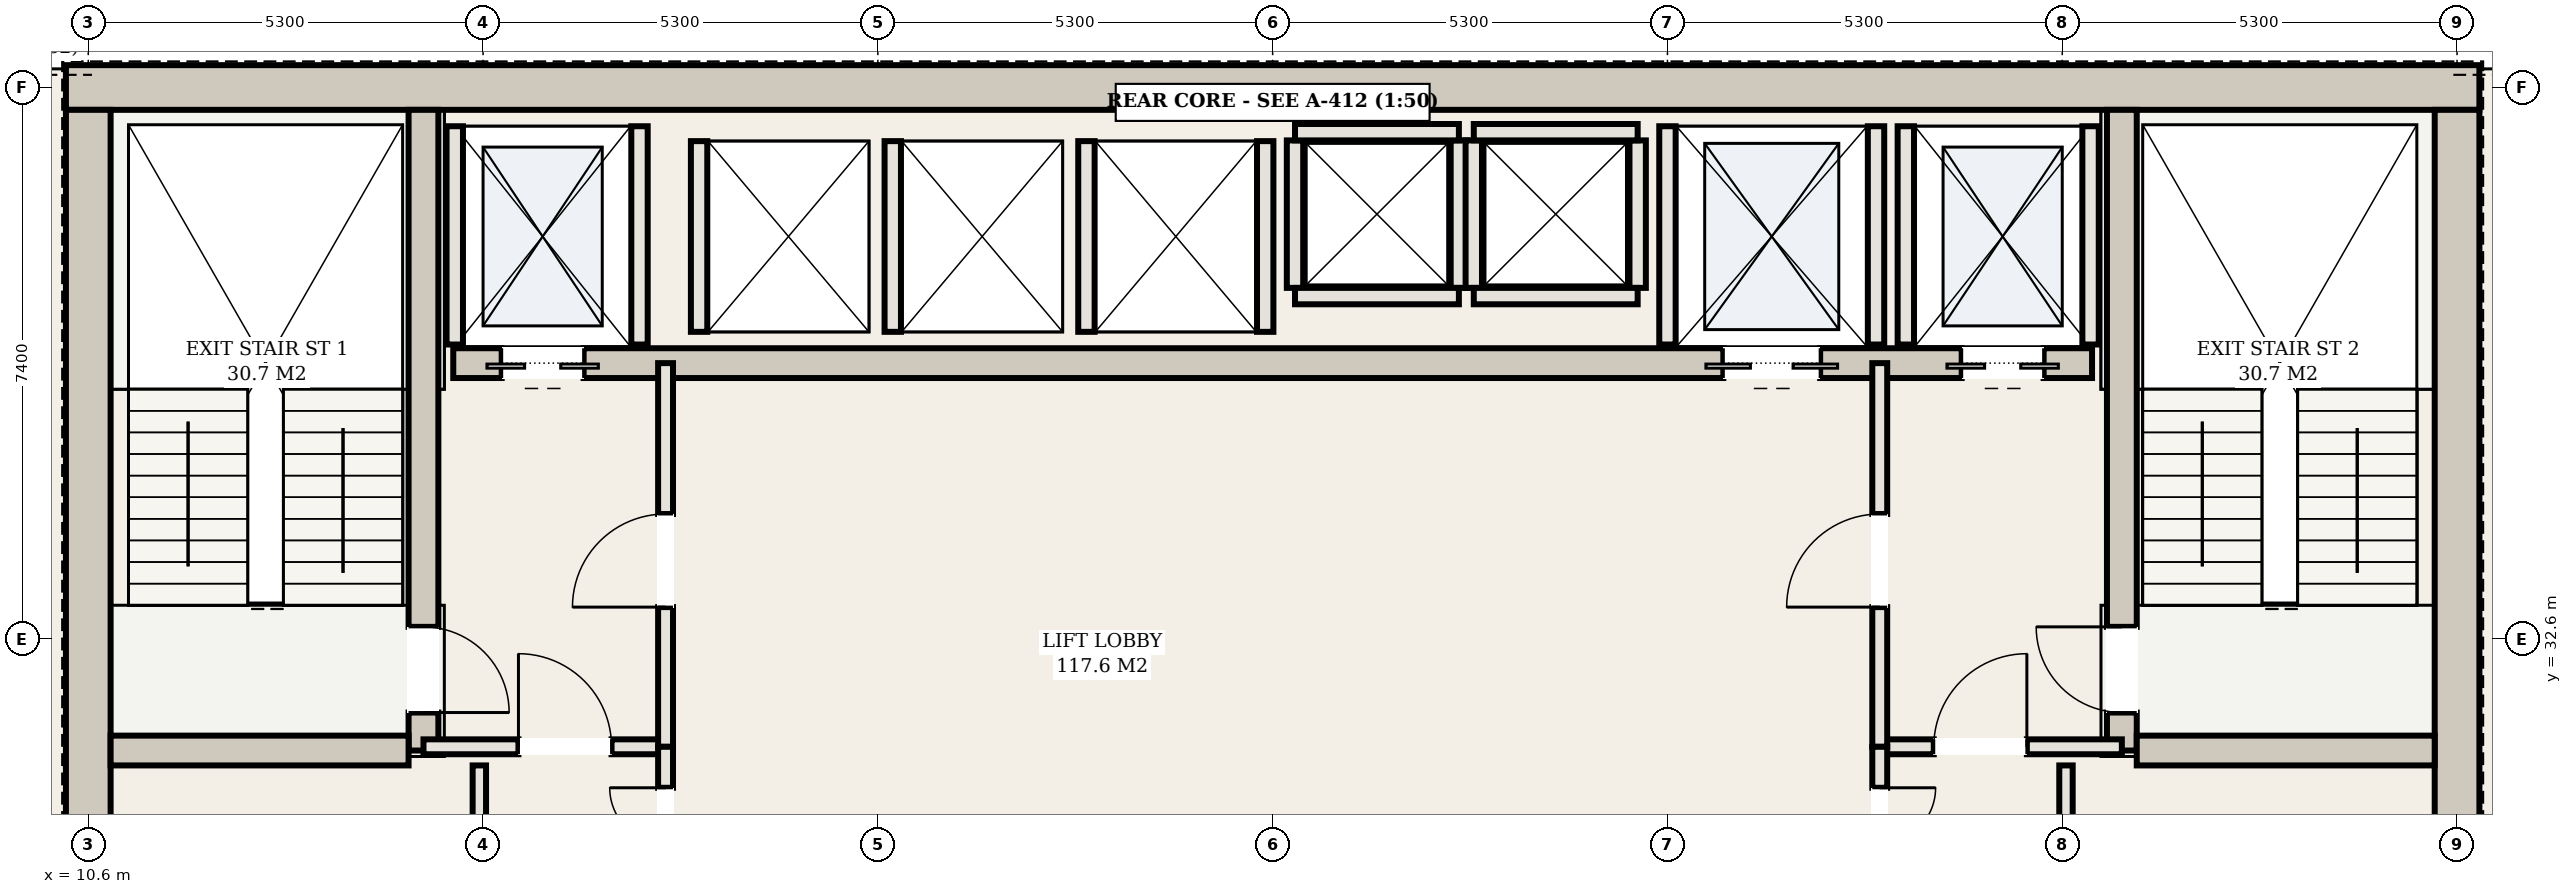
"""IFC4 building model, lengths in metres.
Left out: names, types, materials, properties, quantities, classifications, styles, units other than length and angle.
Written with IfcOpenShell. Run it as: python <this file> out.ifc"""

import sys

from ifc_helpers import new_model, si_unit, direction, frame, frame_2d, origin, place, context, subcontext, project, spatial, rectangle, extrude, element, fill, save


model = new_model("IFC4")
c1 = context("Model", 3, precision=1e-05, world=origin(), true_north=direction((0.0, 1.0)))
c2 = subcontext(c1, "Body", "Model", "MODEL_VIEW")
j1 = project(units=[si_unit("LENGTHUNIT", "METRE"), si_unit("PLANEANGLEUNIT", "RADIAN")], contexts=[c1])
p1 = place(None, origin())
s1 = spatial("IfcSite", under=j1, at=p1, CompositionType="ELEMENT")
p2 = place(p1, origin())
s2 = spatial("IfcBuilding", under=s1, at=p2, CompositionType="ELEMENT")
p3 = place(p2, frame((0.0, 0.0, 185.4)))
s3 = spatial("IfcBuildingStorey", under=s2, at=p3, CompositionType="ELEMENT", Elevation=185.4)
p4 = place(p3, frame((10.3, 40.0, 0.0), z_axis=(0.0, 0.0, 1.0), x_axis=(1.0, 0.0, 0.0)))
e1 = element("IfcWall", 1, at=p4, inside=s3, PredefinedType="SHEAR", context=c2, shape_type="SweptSolid", body=[
    extrude(rectangle(XDim=32.4, YDim=0.6, at=frame_2d((16.2, 0.0))), origin(), (0.0, 0.0, 1.0), 6.56),
])
for number, where, z_axis, x_axis in (
    (2, (10.6, 25.5, 0.0), (0.0, 0.0, 1.0), (0.0, 1.0, 0.0)),
    (3, (42.4, 25.5, 0.0), (0.0, 0.0, 1.0), (0.0, 1.0, 0.0)),
):
    element("IfcWall", number, at=place(p3, frame(where, z_axis=z_axis, x_axis=x_axis)), inside=s3, PredefinedType="SHEAR", context=c2, shape_type="SweptSolid", body=[
        extrude(rectangle(XDim=14.2, YDim=0.6, at=frame_2d((7.1, 0.0))), origin(), (0.0, 0.0, 1.0), 6.56),
    ])
p5 = place(p3, frame((15.1, 31.1, 0.0), z_axis=(0.0, 0.0, 1.0), x_axis=(0.0, 1.0, 0.0)))
e4 = element("IfcWall", 4, at=p5, inside=s3, PredefinedType="SHEAR", context=c2, shape_type="SweptSolid", body=[
    extrude(rectangle(XDim=8.6, YDim=0.4, at=frame_2d((4.3, 0.0))), origin(), (0.0, 0.0, 1.0), 6.56),
])
p6 = place(p5, frame((0.51, 0.0, 0.0)))
e5 = element("IfcOpeningElement", 5, at=p6, cuts=e4, PredefinedType="OPENING", context=c2, shape_type="SweptSolid", body=[
    extrude(rectangle(XDim=1.15, YDim=2.2, at=frame_2d((0.575, 1.1))), frame((0.0, 0.21, 0.0), z_axis=(0.0, -1.0, 0.0), x_axis=(1.0, 0.0, 0.0)), (0.0, 0.0, 1.0), 0.42),
])
p7 = place(p3, frame((10.9, 31.1, 0.0), z_axis=(0.0, 0.0, 1.0), x_axis=(1.0, 0.0, 0.0)))
e6 = element("IfcWall", 6, at=p7, inside=s3, PredefinedType="SHEAR", context=c2, shape_type="SweptSolid", body=[
    extrude(rectangle(XDim=4.0, YDim=0.4, at=frame_2d((2.0, 0.0))), origin(), (0.0, 0.0, 1.0), 6.56),
])
p8 = place(p3, frame((37.9, 31.1, 0.0), z_axis=(0.0, 0.0, 1.0), x_axis=(0.0, 1.0, 0.0)))
e7 = element("IfcWall", 7, at=p8, inside=s3, PredefinedType="SHEAR", context=c2, shape_type="SweptSolid", body=[
    extrude(rectangle(XDim=8.6, YDim=0.4, at=frame_2d((4.3, 0.0))), origin(), (0.0, 0.0, 1.0), 6.56),
])
p9 = place(p8, frame((0.51, 0.0, 0.0)))
e8 = element("IfcOpeningElement", 8, at=p9, cuts=e7, PredefinedType="OPENING", context=c2, shape_type="SweptSolid", body=[
    extrude(rectangle(XDim=1.15, YDim=2.2, at=frame_2d((0.575, 1.1))), frame((0.0, 0.21, 0.0), z_axis=(0.0, -1.0, 0.0), x_axis=(1.0, 0.0, 0.0)), (0.0, 0.0, 1.0), 0.42),
])
p10 = place(p3, frame((38.1, 31.1, 0.0), z_axis=(0.0, 0.0, 1.0), x_axis=(1.0, 0.0, 0.0)))
e9 = element("IfcWall", 9, at=p10, inside=s3, PredefinedType="SHEAR", context=c2, shape_type="SweptSolid", body=[
    extrude(rectangle(XDim=4.0, YDim=0.4, at=frame_2d((2.0, 0.0))), origin(), (0.0, 0.0, 1.0), 6.56),
])
p11 = place(p3, frame((15.5, 36.3, 0.0), z_axis=(0.0, 0.0, 1.0), x_axis=(1.0, 0.0, 0.0)))
e10 = element("IfcWall", 10, at=p11, inside=s3, PredefinedType="SHEAR", context=c2, shape_type="SweptSolid", body=[
    extrude(rectangle(XDim=22.0, YDim=0.4, at=frame_2d((11.0, 0.0))), origin(), (0.0, 0.0, 1.0), 6.56),
])
p12 = place(p11, frame((0.65, 0.0, 0.0)))
e11 = element("IfcOpeningElement", 11, at=p12, cuts=e10, PredefinedType="OPENING", context=c2, shape_type="SweptSolid", body=[
    extrude(rectangle(XDim=1.1, YDim=2.15, at=frame_2d((0.55, 1.075))), frame((0.0, 0.21, 0.0), z_axis=(0.0, -1.0, 0.0), x_axis=(1.0, 0.0, 0.0)), (0.0, 0.0, 1.0), 0.42),
])
p13 = place(p11, frame((20.25, 0.0, 0.0)))
e12 = element("IfcOpeningElement", 12, at=p13, cuts=e10, PredefinedType="OPENING", context=c2, shape_type="SweptSolid", body=[
    extrude(rectangle(XDim=1.1, YDim=2.15, at=frame_2d((0.55, 1.075))), frame((0.0, 0.21, 0.0), z_axis=(0.0, -1.0, 0.0), x_axis=(1.0, 0.0, 0.0)), (0.0, 0.0, 1.0), 0.42),
])
p14 = place(p11, frame((17.05, 0.0, 0.0)))
e13 = element("IfcOpeningElement", 13, at=p14, cuts=e10, PredefinedType="OPENING", context=c2, shape_type="SweptSolid", body=[
    extrude(rectangle(XDim=1.3, YDim=2.2, at=frame_2d((0.65, 1.1))), frame((0.0, 0.21, 0.0), z_axis=(0.0, -1.0, 0.0), x_axis=(1.0, 0.0, 0.0)), (0.0, 0.0, 1.0), 0.42),
])
for number, where, z_axis, x_axis in (
    (14, (15.52, 36.55, 0.0), (0.0, 0.0, 1.0), (0.0, 1.0, 0.0)),
    (15, (18.0, 36.55, 0.0), (0.0, 0.0, 1.0), (0.0, 1.0, 0.0)),
    (16, (35.0, 36.55, 0.0), (0.0, 0.0, 1.0), (0.0, 1.0, 0.0)),
    (17, (37.48, 36.55, 0.0), (0.0, 0.0, 1.0), (0.0, 1.0, 0.0)),
    (18, (31.8, 36.55, 0.0), (0.0, 0.0, 1.0), (0.0, 1.0, 0.0)),
    (19, (34.6, 36.55, 0.0), (0.0, 0.0, 1.0), (0.0, 1.0, 0.0)),
):
    element("IfcWall", number, at=place(p3, frame(where, z_axis=z_axis, x_axis=x_axis)), inside=s3, PredefinedType="SOLIDWALL", context=c2, shape_type="SweptSolid", body=[
        extrude(rectangle(XDim=2.93, YDim=0.22, at=frame_2d((1.465, 0.0))), origin(), (0.0, 0.0, 1.0), 6.56),
    ])
for number, where, z_axis, x_axis in (
    (20, (18.8, 36.72, 0.0), (0.0, 0.0, 1.0), (0.0, 1.0, 0.0)),
    (21, (21.4, 36.72, 0.0), (0.0, 0.0, 1.0), (0.0, 1.0, 0.0)),
    (22, (24.0, 36.72, 0.0), (0.0, 0.0, 1.0), (0.0, 1.0, 0.0)),
    (23, (26.4, 36.72, 0.0), (0.0, 0.0, 1.0), (0.0, 1.0, 0.0)),
):
    element("IfcWall", number, at=place(p3, frame(where, z_axis=z_axis, x_axis=x_axis)), inside=s3, PredefinedType="SOLIDWALL", context=c2, shape_type="SweptSolid", body=[
        extrude(rectangle(XDim=2.56, YDim=0.22, at=frame_2d((1.28, 0.0))), origin(), (0.0, 0.0, 1.0), 6.56),
    ])
for number, where, z_axis, x_axis in (
    (24, (26.8, 37.31, 0.0), (0.0, 0.0, 1.0), (0.0, 1.0, 0.0)),
    (25, (29.0, 37.31, 0.0), (0.0, 0.0, 1.0), (0.0, 1.0, 0.0)),
):
    element("IfcWall", number, at=place(p3, frame(where, z_axis=z_axis, x_axis=x_axis)), inside=s3, PredefinedType="SOLIDWALL", context=c2, shape_type="SweptSolid", body=[
        extrude(rectangle(XDim=1.98, YDim=0.22, at=frame_2d((0.99, 0.0))), origin(), (0.0, 0.0, 1.0), 6.56),
    ])
for number, where, z_axis, x_axis in (
    (26, (26.8, 39.4, 0.0), (0.0, 0.0, 1.0), (1.0, 0.0, 0.0)),
    (27, (26.8, 37.2, 0.0), (0.0, 0.0, 1.0), (1.0, 0.0, 0.0)),
):
    element("IfcWall", number, at=place(p3, frame(where, z_axis=z_axis, x_axis=x_axis)), inside=s3, PredefinedType="SOLIDWALL", context=c2, shape_type="SweptSolid", body=[
        extrude(rectangle(XDim=2.2, YDim=0.22, at=frame_2d((1.1, 0.0))), origin(), (0.0, 0.0, 1.0), 6.56),
    ])
for number, where, z_axis, x_axis in (
    (28, (29.2, 37.31, 0.0), (0.0, 0.0, 1.0), (0.0, 1.0, 0.0)),
    (29, (31.4, 37.31, 0.0), (0.0, 0.0, 1.0), (0.0, 1.0, 0.0)),
):
    element("IfcWall", number, at=place(p3, frame(where, z_axis=z_axis, x_axis=x_axis)), inside=s3, PredefinedType="SOLIDWALL", context=c2, shape_type="SweptSolid", body=[
        extrude(rectangle(XDim=1.98, YDim=0.22, at=frame_2d((0.99, 0.0))), origin(), (0.0, 0.0, 1.0), 6.56),
    ])
for number, where, z_axis, x_axis in (
    (30, (29.2, 39.4, 0.0), (0.0, 0.0, 1.0), (1.0, 0.0, 0.0)),
    (31, (29.2, 37.2, 0.0), (0.0, 0.0, 1.0), (1.0, 0.0, 0.0)),
):
    element("IfcWall", number, at=place(p3, frame(where, z_axis=z_axis, x_axis=x_axis)), inside=s3, PredefinedType="SOLIDWALL", context=c2, shape_type="SweptSolid", body=[
        extrude(rectangle(XDim=2.2, YDim=0.22, at=frame_2d((1.1, 0.0))), origin(), (0.0, 0.0, 1.0), 6.56),
    ])
p15 = place(p3, frame((15.1, 31.15, 0.0), z_axis=(0.0, 0.0, 1.0), x_axis=(1.0, 0.0, 0.0)))
e32 = element("IfcWall", 32, at=p15, inside=s3, PredefinedType="PARTITIONING", context=c2, shape_type="SweptSolid", body=[
    extrude(rectangle(XDim=3.25, YDim=0.2, at=frame_2d((1.625, 0.0))), origin(), (0.0, 0.0, 1.0), 6.56),
])
p16 = place(p15, frame((1.275, 0.0, 0.0)))
e33 = element("IfcOpeningElement", 33, at=p16, cuts=e32, PredefinedType="OPENING", context=c2, shape_type="SweptSolid", body=[
    extrude(rectangle(XDim=1.25, YDim=2.2, at=frame_2d((0.625, 1.1))), frame((0.0, 0.11, 0.0), z_axis=(0.0, -1.0, 0.0), x_axis=(1.0, 0.0, 0.0)), (0.0, 0.0, 1.0), 0.22),
])
p17 = place(p3, frame((18.35, 31.15, 0.0), z_axis=(0.0, 0.0, 1.0), x_axis=(0.0, 1.0, 0.0)))
e34 = element("IfcWall", 34, at=p17, inside=s3, PredefinedType="PARTITIONING", context=c2, shape_type="SweptSolid", body=[
    extrude(rectangle(XDim=5.15, YDim=0.2, at=frame_2d((2.575, 0.0))), origin(), (0.0, 0.0, 1.0), 6.56),
])
p18 = place(p17, frame((1.875, 0.0, 0.0)))
e35 = element("IfcOpeningElement", 35, at=p18, cuts=e34, PredefinedType="OPENING", context=c2, shape_type="SweptSolid", body=[
    extrude(rectangle(XDim=1.25, YDim=2.2, at=frame_2d((0.625, 1.1))), frame((0.0, 0.11, 0.0), z_axis=(0.0, -1.0, 0.0), x_axis=(1.0, 0.0, 0.0)), (0.0, 0.0, 1.0), 0.22),
])
p19 = place(p3, frame((34.65, 31.15, 0.0), z_axis=(0.0, 0.0, 1.0), x_axis=(1.0, 0.0, 0.0)))
e36 = element("IfcWall", 36, at=p19, inside=s3, PredefinedType="PARTITIONING", context=c2, shape_type="SweptSolid", body=[
    extrude(rectangle(XDim=3.25, YDim=0.2, at=frame_2d((1.625, 0.0))), origin(), (0.0, 0.0, 1.0), 6.56),
])
p20 = place(p19, frame((0.725, 0.0, 0.0)))
e37 = element("IfcOpeningElement", 37, at=p20, cuts=e36, PredefinedType="OPENING", context=c2, shape_type="SweptSolid", body=[
    extrude(rectangle(XDim=1.25, YDim=2.2, at=frame_2d((0.625, 1.1))), frame((0.0, 0.11, 0.0), z_axis=(0.0, -1.0, 0.0), x_axis=(1.0, 0.0, 0.0)), (0.0, 0.0, 1.0), 0.22),
])
p21 = place(p3, frame((34.65, 31.15, 0.0), z_axis=(0.0, 0.0, 1.0), x_axis=(0.0, 1.0, 0.0)))
e38 = element("IfcWall", 38, at=p21, inside=s3, PredefinedType="PARTITIONING", context=c2, shape_type="SweptSolid", body=[
    extrude(rectangle(XDim=5.15, YDim=0.2, at=frame_2d((2.575, 0.0))), origin(), (0.0, 0.0, 1.0), 6.56),
])
p22 = place(p21, frame((1.875, 0.0, 0.0)))
e39 = element("IfcOpeningElement", 39, at=p22, cuts=e38, PredefinedType="OPENING", context=c2, shape_type="SweptSolid", body=[
    extrude(rectangle(XDim=1.25, YDim=2.2, at=frame_2d((0.625, 1.1))), frame((0.0, 0.11, 0.0), z_axis=(0.0, -1.0, 0.0), x_axis=(1.0, 0.0, 0.0)), (0.0, 0.0, 1.0), 0.22),
])
p23 = place(p3, frame((15.85, 25.5, 0.0), z_axis=(0.0, 0.0, 1.0), x_axis=(0.0, 1.0, 0.0)))
e40 = element("IfcWall", 40, at=p23, inside=s3, PredefinedType="PARTITIONING", context=c2, shape_type="SweptSolid", body=[
    extrude(rectangle(XDim=5.4, YDim=0.18, at=frame_2d((2.7, 0.0))), origin(), (0.0, 0.0, 1.0), 5.055),
])
p24 = place(p23, frame((2.24, 0.0, 0.0)))
e41 = element("IfcOpeningElement", 41, at=p24, cuts=e40, PredefinedType="OPENING", context=c2, shape_type="SweptSolid", body=[
    extrude(rectangle(XDim=0.92, YDim=2.15, at=frame_2d((0.46, 1.075))), frame((0.0, 0.1, 0.0), z_axis=(0.0, -1.0, 0.0), x_axis=(1.0, 0.0, 0.0)), (0.0, 0.0, 1.0), 0.2),
])
p25 = place(p3, frame((37.15, 25.5, 0.0), z_axis=(0.0, 0.0, 1.0), x_axis=(0.0, 1.0, 0.0)))
e42 = element("IfcWall", 42, at=p25, inside=s3, PredefinedType="PARTITIONING", context=c2, shape_type="SweptSolid", body=[
    extrude(rectangle(XDim=5.4, YDim=0.18, at=frame_2d((2.7, 0.0))), origin(), (0.0, 0.0, 1.0), 5.055),
])
p26 = place(p25, frame((2.24, 0.0, 0.0)))
e43 = element("IfcOpeningElement", 43, at=p26, cuts=e42, PredefinedType="OPENING", context=c2, shape_type="SweptSolid", body=[
    extrude(rectangle(XDim=0.92, YDim=2.15, at=frame_2d((0.46, 1.075))), frame((0.0, 0.1, 0.0), z_axis=(0.0, -1.0, 0.0), x_axis=(1.0, 0.0, 0.0)), (0.0, 0.0, 1.0), 0.2),
])
p27 = place(p3, frame((18.35, 28.55, 0.0), z_axis=(0.0, 0.0, 1.0), x_axis=(0.0, 1.0, 0.0)))
e44 = element("IfcWall", 44, at=p27, inside=s3, PredefinedType="PARTITIONING", context=c2, shape_type="SweptSolid", body=[
    extrude(rectangle(XDim=2.6, YDim=0.2, at=frame_2d((1.3, 0.0))), origin(), (0.0, 0.0, 1.0), 6.56),
])
p28 = place(p27, frame((0.55, 0.0, 0.0)))
e45 = element("IfcOpeningElement", 45, at=p28, cuts=e44, PredefinedType="OPENING", context=c2, shape_type="SweptSolid", body=[
    extrude(rectangle(XDim=1.5, YDim=2.25, at=frame_2d((0.75, 1.125))), frame((0.0, 0.11, 0.0), z_axis=(0.0, -1.0, 0.0), x_axis=(1.0, 0.0, 0.0)), (0.0, 0.0, 1.0), 0.22),
])
p29 = place(p3, frame((34.65, 28.55, 0.0), z_axis=(0.0, 0.0, 1.0), x_axis=(0.0, 1.0, 0.0)))
e46 = element("IfcWall", 46, at=p29, inside=s3, PredefinedType="PARTITIONING", context=c2, shape_type="SweptSolid", body=[
    extrude(rectangle(XDim=2.6, YDim=0.2, at=frame_2d((1.3, 0.0))), origin(), (0.0, 0.0, 1.0), 6.56),
])
p30 = place(p29, frame((0.55, 0.0, 0.0)))
e47 = element("IfcOpeningElement", 47, at=p30, cuts=e46, PredefinedType="OPENING", context=c2, shape_type="SweptSolid", body=[
    extrude(rectangle(XDim=1.5, YDim=2.25, at=frame_2d((0.75, 1.125))), frame((0.0, 0.11, 0.0), z_axis=(0.0, -1.0, 0.0), x_axis=(1.0, 0.0, 0.0)), (0.0, 0.0, 1.0), 0.22),
])
p31 = place(p12, frame((1.1, 0.0, 0.0), z_axis=(0.0, 0.0, 1.0), x_axis=(-1.0, 0.0, 0.0)))
e48 = element("IfcDoor", 48, at=p31, inside=s3, OperationType="DOUBLE_DOOR_SLIDING", PredefinedType="DOOR", context=c2, shape_type="SweptSolid", body=[
    extrude(rectangle(XDim=1.1, YDim=2.15, at=frame_2d((0.55, 1.075))), frame((0.0, 0.025, 0.0), z_axis=(0.0, -1.0, 0.0), x_axis=(1.0, 0.0, 0.0)), (0.0, 0.0, 1.0), 0.05),
])
fill(e11, e48)
p32 = place(p13, frame((1.1, 0.0, 0.0), z_axis=(0.0, 0.0, 1.0), x_axis=(-1.0, 0.0, 0.0)))
e49 = element("IfcDoor", 49, at=p32, inside=s3, OperationType="DOUBLE_DOOR_SLIDING", PredefinedType="DOOR", context=c2, shape_type="SweptSolid", body=[
    extrude(rectangle(XDim=1.1, YDim=2.15, at=frame_2d((0.55, 1.075))), frame((0.0, 0.025, 0.0), z_axis=(0.0, -1.0, 0.0), x_axis=(1.0, 0.0, 0.0)), (0.0, 0.0, 1.0), 0.05),
])
fill(e12, e49)
p33 = place(p14, frame((1.3, 0.0, 0.0), z_axis=(0.0, 0.0, 1.0), x_axis=(-1.0, 0.0, 0.0)))
e50 = element("IfcDoor", 50, at=p33, inside=s3, OperationType="DOUBLE_DOOR_SLIDING", PredefinedType="DOOR", context=c2, shape_type="SweptSolid", body=[
    extrude(rectangle(XDim=1.3, YDim=2.2, at=frame_2d((0.65, 1.1))), frame((0.0, 0.025, 0.0), z_axis=(0.0, -1.0, 0.0), x_axis=(1.0, 0.0, 0.0)), (0.0, 0.0, 1.0), 0.05),
])
fill(e13, e50)
p34 = place(p16, origin())
e51 = element("IfcDoor", 51, at=p34, inside=s3, OperationType="SINGLE_SWING_LEFT", PredefinedType="DOOR", context=c2, shape_type="SweptSolid", body=[
    extrude(rectangle(XDim=1.25, YDim=2.2, at=frame_2d((0.625, 1.1))), frame((0.0, 0.025, 0.0), z_axis=(0.0, -1.0, 0.0), x_axis=(1.0, 0.0, 0.0)), (0.0, 0.0, 1.0), 0.05),
])
fill(e33, e51)
p35 = place(p18, origin())
e52 = element("IfcDoor", 52, at=p35, inside=s3, OperationType="SINGLE_SWING_LEFT", PredefinedType="DOOR", context=c2, shape_type="SweptSolid", body=[
    extrude(rectangle(XDim=1.25, YDim=2.2, at=frame_2d((0.625, 1.1))), frame((0.0, 0.025, 0.0), z_axis=(0.0, -1.0, 0.0), x_axis=(1.0, 0.0, 0.0)), (0.0, 0.0, 1.0), 0.05),
])
fill(e35, e52)
p36 = place(p20, origin())
e53 = element("IfcDoor", 53, at=p36, inside=s3, OperationType="SINGLE_SWING_RIGHT", PredefinedType="DOOR", context=c2, shape_type="SweptSolid", body=[
    extrude(rectangle(XDim=1.25, YDim=2.2, at=frame_2d((0.625, 1.1))), frame((0.0, 0.025, 0.0), z_axis=(0.0, -1.0, 0.0), x_axis=(1.0, 0.0, 0.0)), (0.0, 0.0, 1.0), 0.05),
])
fill(e37, e53)
p37 = place(p22, origin())
e54 = element("IfcDoor", 54, at=p37, inside=s3, OperationType="SINGLE_SWING_LEFT", PredefinedType="DOOR", context=c2, shape_type="SweptSolid", body=[
    extrude(rectangle(XDim=1.25, YDim=2.2, at=frame_2d((0.625, 1.1))), frame((0.0, 0.025, 0.0), z_axis=(0.0, -1.0, 0.0), x_axis=(1.0, 0.0, 0.0)), (0.0, 0.0, 1.0), 0.05),
])
fill(e39, e54)
p38 = place(p6, frame((1.15, 0.0, 0.0), z_axis=(0.0, 0.0, 1.0), x_axis=(-1.0, 0.0, 0.0)))
e55 = element("IfcDoor", 55, at=p38, inside=s3, OperationType="SINGLE_SWING_RIGHT", PredefinedType="DOOR", context=c2, shape_type="SweptSolid", body=[
    extrude(rectangle(XDim=1.15, YDim=2.2, at=frame_2d((0.575, 1.1))), frame((0.0, 0.025, 0.0), z_axis=(0.0, -1.0, 0.0), x_axis=(1.0, 0.0, 0.0)), (0.0, 0.0, 1.0), 0.05),
])
fill(e5, e55)
p39 = place(p9, origin())
e56 = element("IfcDoor", 56, at=p39, inside=s3, OperationType="SINGLE_SWING_RIGHT", PredefinedType="DOOR", context=c2, shape_type="SweptSolid", body=[
    extrude(rectangle(XDim=1.15, YDim=2.2, at=frame_2d((0.575, 1.1))), frame((0.0, 0.025, 0.0), z_axis=(0.0, -1.0, 0.0), x_axis=(1.0, 0.0, 0.0)), (0.0, 0.0, 1.0), 0.05),
])
fill(e8, e56)
p40 = place(p28, origin())
e57 = element("IfcDoor", 57, at=p40, inside=s3, OperationType="DOUBLE_DOOR_SINGLE_SWING", PredefinedType="DOOR", context=c2, shape_type="SweptSolid", body=[
    extrude(rectangle(XDim=1.5, YDim=2.25, at=frame_2d((0.75, 1.125))), frame((0.0, 0.025, 0.0), z_axis=(0.0, -1.0, 0.0), x_axis=(1.0, 0.0, 0.0)), (0.0, 0.0, 1.0), 0.05),
])
fill(e45, e57)
p41 = place(p30, frame((1.5, 0.0, 0.0), z_axis=(0.0, 0.0, 1.0), x_axis=(-1.0, 0.0, 0.0)))
e58 = element("IfcDoor", 58, at=p41, inside=s3, OperationType="DOUBLE_DOOR_SINGLE_SWING", PredefinedType="DOOR", context=c2, shape_type="SweptSolid", body=[
    extrude(rectangle(XDim=1.5, YDim=2.25, at=frame_2d((0.75, 1.125))), frame((0.0, 0.025, 0.0), z_axis=(0.0, -1.0, 0.0), x_axis=(1.0, 0.0, 0.0)), (0.0, 0.0, 1.0), 0.05),
])
fill(e47, e58)
save(model, sys.argv[1])
